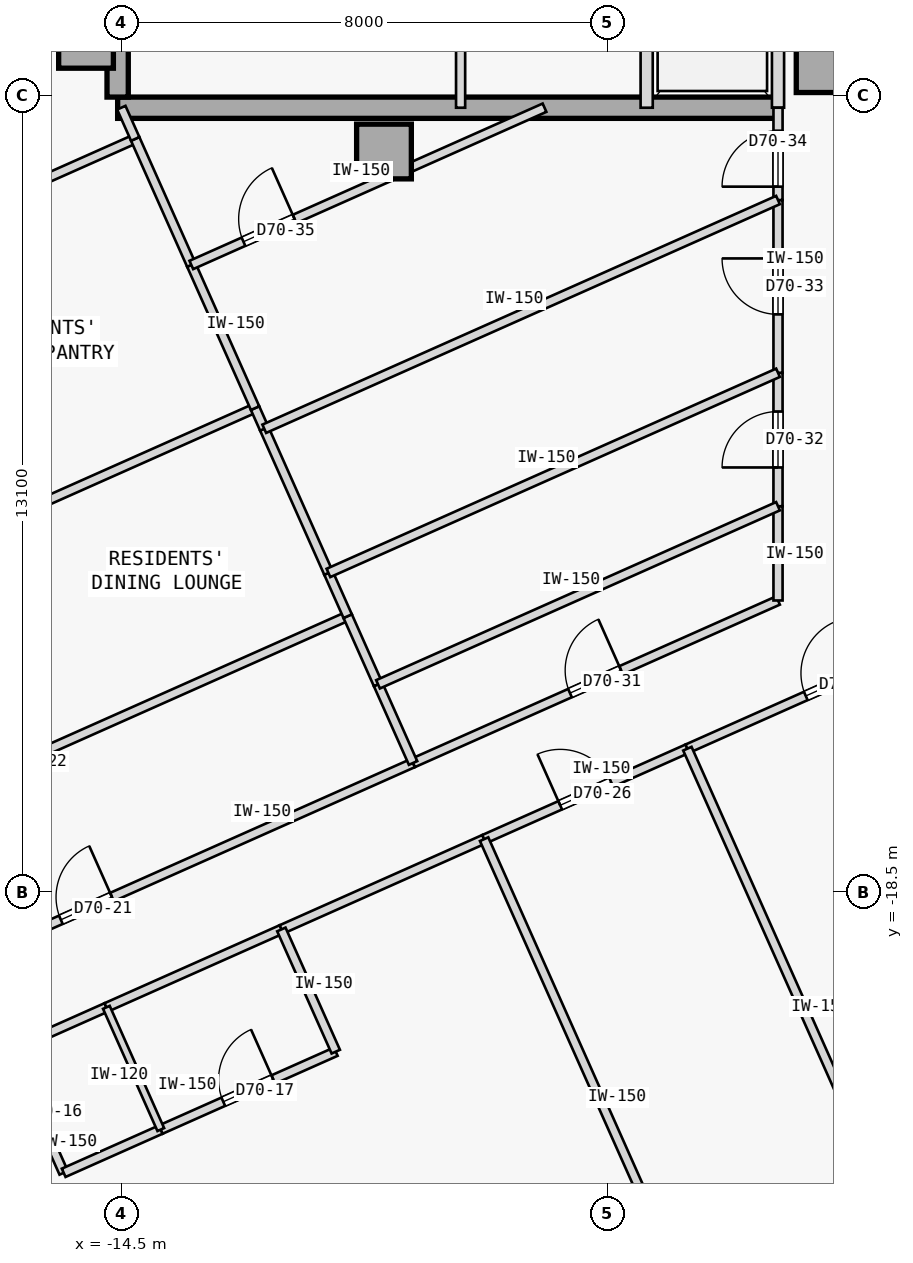
"""IFC4 building model, lengths in metres.
Left out: names, types, materials, properties, quantities, classifications, styles, units other than length and angle.
Written with IfcOpenShell. Run it as: python <this file> out.ifc"""

import sys

from ifc_helpers import new_model, si_unit, direction, frame, frame_2d, origin, origin_2d, place, context, subcontext, project, spatial, rectangle, extrude, element, fill, save


model = new_model("IFC4")
c1 = context("Model", 3, precision=1e-05, world=origin(), true_north=direction((0.0, 1.0)))
c2 = subcontext(c1, "Body", "Model", "MODEL_VIEW")
j1 = project(units=[si_unit("LENGTHUNIT", "METRE"), si_unit("PLANEANGLEUNIT", "RADIAN")], contexts=[c1])
p1 = place(None, origin())
s1 = spatial("IfcSite", under=j1, at=p1, CompositionType="ELEMENT")
p2 = place(p1, origin())
s2 = spatial("IfcBuilding", under=s1, at=p2, CompositionType="ELEMENT")
p3 = place(p2, frame((0.0, 0.0, 262.2)))
s3 = spatial("IfcBuildingStorey", under=s2, at=p3, CompositionType="ELEMENT", Elevation=262.2)
for number, where, z_axis, x_axis in (
    (1, (-15.08, -4.5, 0.0), (0.0, 0.0, 1.0), (1.0, 0.0, 0.0)),
    (2, (-10.18, -6.32, 0.0), (0.0, 0.0, 1.0), (1.0, 0.0, 0.0)),
    (3, (-2.95, -4.9, 0.0), (0.0, 0.0, 1.0), (1.0, 0.0, 0.0)),
):
    element("IfcColumn", number, at=place(p3, frame(where, z_axis=z_axis, x_axis=x_axis)), inside=s3, PredefinedType="COLUMN", context=c2, shape_type="SweptSolid", body=[
        extrude(rectangle(XDim=0.9, YDim=0.9, at=origin_2d()), origin(), (0.0, 0.0, 1.0), 3.35),
    ])
p4 = place(p3, frame((-14.56, -5.6, 0.0), z_axis=(0.0, 0.0, 1.0), x_axis=(1.0, 0.0, 0.0)))
e4 = element("IfcWall", 4, at=p4, inside=s3, PredefinedType="SHEAR", context=c2, shape_type="SweptSolid", body=[
    extrude(rectangle(XDim=10.86, YDim=0.35, at=frame_2d((5.43, 0.0))), origin(), (0.0, 0.0, 1.0), 3.125),
])
p5 = place(p3, frame((-14.56, -5.425, 0.0), z_axis=(0.0, 0.0, 1.0), x_axis=(0.0, 1.0, 0.0)))
e5 = element("IfcWall", 5, at=p5, inside=s3, PredefinedType="SHEAR", context=c2, shape_type="SweptSolid", body=[
    extrude(rectangle(XDim=10.85, YDim=0.35, at=frame_2d((5.425, 0.0))), origin(), (0.0, 0.0, 1.0), 3.125),
])
for number, where, z_axis, x_axis in (
    (6, (-3.7, -5.6, 0.0), (0.0, 0.0, 1.0), (0.0, 1.0, 0.0)),
    (7, (-5.86, -5.6, 0.0), (0.0, 0.0, 1.0), (0.0, 1.0, 0.0)),
):
    element("IfcWall", number, at=place(p3, frame(where, z_axis=z_axis, x_axis=x_axis)), inside=s3, PredefinedType="STANDARD", context=c2, shape_type="SweptSolid", body=[
        extrude(rectangle(XDim=2.65, YDim=0.2, at=frame_2d((1.325, 0.0))), origin(), (0.0, 0.0, 1.0), 3.125),
    ])
p6 = place(p3, frame((-8.92, -5.6, 0.0), z_axis=(0.0, 0.0, 1.0), x_axis=(0.0, 1.0, 0.0)))
e8 = element("IfcWall", 8, at=p6, inside=s3, PredefinedType="PARTITIONING", context=c2, shape_type="SweptSolid", body=[
    extrude(rectangle(XDim=2.65, YDim=0.15, at=frame_2d((1.325, 0.0))), origin(), (0.0, 0.0, 1.0), 3.125),
])
p7 = place(p3, frame((-11.868, -19.113, 0.0), z_axis=(0.0, 0.0, 1.0), x_axis=(0.913543802, 0.40674036169, 0.0)))
e9 = element("IfcWall", 9, at=p7, inside=s3, PredefinedType="PARTITIONING", context=c2, shape_type="SweptSolid", body=[
    extrude(rectangle(XDim=3.65, YDim=0.15, at=frame_2d((1.825, 0.0))), origin(), (0.0, 0.0, 1.0), 3.125),
])
p8 = place(p3, frame((-16.342, -21.105, 0.0), z_axis=(0.0, 0.0, 1.0), x_axis=(0.9135579554, 0.406708571492, 0.0)))
e10 = element("IfcWall", 10, at=p8, inside=s3, PredefinedType="PARTITIONING", context=c2, shape_type="SweptSolid", body=[
    extrude(rectangle(XDim=1.748, YDim=0.15, at=frame_2d((0.874, 0.0))), origin(), (0.0, 0.0, 1.0), 3.125),
])
p9 = place(p3, frame((-14.745, -20.394, 0.0), z_axis=(0.0, 0.0, 1.0), x_axis=(0.913542880558, 0.406742431252, 0.0)))
e11 = element("IfcWall", 11, at=p9, inside=s3, PredefinedType="PARTITIONING", context=c2, shape_type="SweptSolid", body=[
    extrude(rectangle(XDim=3.15, YDim=0.15, at=frame_2d((1.575, 0.0))), origin(), (0.0, 0.0, 1.0), 3.125),
])
p10 = place(p3, frame((-20.445, -21.159, 0.0), z_axis=(0.0, 0.0, 1.0), x_axis=(0.913547681516, 0.406731648137, 0.0)))
e12 = element("IfcWall", 12, at=p10, inside=s3, PredefinedType="PARTITIONING", context=c2, shape_type="SweptSolid", body=[
    extrude(rectangle(XDim=11.76, YDim=0.15, at=frame_2d((5.88, 0.0))), origin(), (0.0, 0.0, 1.0), 3.125),
])
p11 = place(p10, frame((5.42, 0.0, 0.0)))
e13 = element("IfcOpeningElement", 13, at=p11, cuts=e12, PredefinedType="OPENING", context=c2, shape_type="SweptSolid", body=[
    extrude(rectangle(XDim=0.92, YDim=2.15, at=frame_2d((0.46, 1.075))), frame((0.0, 0.085, 0.0), z_axis=(0.0, -1.0, 0.0), x_axis=(1.0, 0.0, 0.0)), (0.0, 0.0, 1.0), 0.17),
])
p12 = place(p3, frame((-8.533, -17.628, 0.0), z_axis=(0.0, 0.0, 1.0), x_axis=(0.913560976273, 0.406701785873, 0.0)))
e14 = element("IfcWall", 14, at=p12, inside=s3, PredefinedType="PARTITIONING", context=c2, shape_type="SweptSolid", body=[
    extrude(rectangle(XDim=3.659, YDim=0.15, at=frame_2d((1.829, 0.0))), origin(), (0.0, 0.0, 1.0), 3.125),
])
p13 = place(p12, frame((1.369, 0.0, 0.0)))
e15 = element("IfcOpeningElement", 15, at=p13, cuts=e14, PredefinedType="OPENING", context=c2, shape_type="SweptSolid", body=[
    extrude(rectangle(XDim=0.92, YDim=2.15, at=frame_2d((0.46, 1.075))), frame((0.0, 0.085, 0.0), z_axis=(0.0, -1.0, 0.0), x_axis=(1.0, 0.0, 0.0)), (0.0, 0.0, 1.0), 0.17),
])
p14 = place(p3, frame((-5.191, -16.14, 0.0), z_axis=(0.0, 0.0, 1.0), x_axis=(0.913541346619, 0.40674587646, 0.0)))
e16 = element("IfcWall", 16, at=p14, inside=s3, PredefinedType="PARTITIONING", context=c2, shape_type="SweptSolid", body=[
    extrude(rectangle(XDim=5.183, YDim=0.15, at=frame_2d((2.591, 0.0))), origin(), (0.0, 0.0, 1.0), 3.125),
])
p15 = place(p14, frame((2.132, 0.0, 0.0)))
e17 = element("IfcOpeningElement", 17, at=p15, cuts=e16, PredefinedType="OPENING", context=c2, shape_type="SweptSolid", body=[
    extrude(rectangle(XDim=0.92, YDim=2.15, at=frame_2d((0.46, 1.075))), frame((0.0, 0.085, 0.0), z_axis=(0.0, -1.0, 0.0), x_axis=(1.0, 0.0, 0.0)), (0.0, 0.0, 1.0), 0.17),
])
p16 = place(p3, frame((-9.702, -16.375, 0.0), z_axis=(0.0, 0.0, 1.0), x_axis=(0.913552389019, 0.406721074594, 0.0)))
e18 = element("IfcWall", 18, at=p16, inside=s3, PredefinedType="PARTITIONING", context=c2, shape_type="SweptSolid", body=[
    extrude(rectangle(XDim=6.57, YDim=0.15, at=frame_2d((3.285, 0.0))), origin(), (0.0, 0.0, 1.0), 3.125),
])
p17 = place(p16, frame((2.825, 0.0, 0.0)))
e19 = element("IfcOpeningElement", 19, at=p17, cuts=e18, PredefinedType="OPENING", context=c2, shape_type="SweptSolid", body=[
    extrude(rectangle(XDim=0.92, YDim=2.15, at=frame_2d((0.46, 1.075))), frame((0.0, 0.085, 0.0), z_axis=(0.0, -1.0, 0.0), x_axis=(1.0, 0.0, 0.0)), (0.0, 0.0, 1.0), 0.17),
])
p18 = place(p3, frame((-3.7, -13.703, 0.0), z_axis=(0.0, 0.0, 1.0), x_axis=(-0.000157529929, 0.999999987592, 0.0)))
e20 = element("IfcWall", 20, at=p18, inside=s3, PredefinedType="PARTITIONING", context=c2, shape_type="SweptSolid", body=[
    extrude(rectangle(XDim=1.55, YDim=0.15, at=frame_2d((0.775, 0.0))), origin(), (0.0, 0.0, 1.0), 3.125),
])
p19 = place(p3, frame((-3.7, -12.154, 0.0), z_axis=(0.0, 0.0, 1.0), x_axis=(0.000111222333, 0.999999993815, 0.0)))
e21 = element("IfcWall", 21, at=p19, inside=s3, PredefinedType="PARTITIONING", context=c2, shape_type="SweptSolid", body=[
    extrude(rectangle(XDim=2.195, YDim=0.15, at=frame_2d((1.098, 0.0))), origin(), (0.0, 0.0, 1.0), 3.125),
])
p20 = place(p19, frame((0.637, 0.0, 0.0)))
e22 = element("IfcOpeningElement", 22, at=p20, cuts=e21, PredefinedType="OPENING", context=c2, shape_type="SweptSolid", body=[
    extrude(rectangle(XDim=0.92, YDim=2.15, at=frame_2d((0.46, 1.075))), frame((0.0, 0.085, 0.0), z_axis=(0.0, -1.0, 0.0), x_axis=(1.0, 0.0, 0.0)), (0.0, 0.0, 1.0), 0.17),
])
p21 = place(p3, frame((-3.7, -9.958, 0.0), z_axis=(0.0, 0.0, 1.0), x_axis=(-0.000171909917, 0.999999985223, 0.0)))
e23 = element("IfcWall", 23, at=p21, inside=s3, PredefinedType="PARTITIONING", context=c2, shape_type="SweptSolid", body=[
    extrude(rectangle(XDim=2.84, YDim=0.15, at=frame_2d((1.42, 0.0))), origin(), (0.0, 0.0, 1.0), 3.125),
])
p22 = place(p21, frame((0.96, 0.0, 0.0)))
e24 = element("IfcOpeningElement", 24, at=p22, cuts=e23, PredefinedType="OPENING", context=c2, shape_type="SweptSolid", body=[
    extrude(rectangle(XDim=0.92, YDim=2.15, at=frame_2d((0.46, 1.075))), frame((0.0, 0.085, 0.0), z_axis=(0.0, -1.0, 0.0), x_axis=(1.0, 0.0, 0.0)), (0.0, 0.0, 1.0), 0.17),
])
p23 = place(p3, frame((-3.7, -7.118, 0.0), z_axis=(0.0, 0.0, 1.0), x_axis=(0.000321543392, 0.999999948305, 0.0)))
e25 = element("IfcWall", 25, at=p23, inside=s3, PredefinedType="PARTITIONING", context=c2, shape_type="SweptSolid", body=[
    extrude(rectangle(XDim=1.519, YDim=0.15, at=frame_2d((0.759, 0.0))), origin(), (0.0, 0.0, 1.0), 3.125),
])
p24 = place(p23, frame((0.22, 0.0, 0.0)))
e26 = element("IfcOpeningElement", 26, at=p24, cuts=e25, PredefinedType="OPENING", context=c2, shape_type="SweptSolid", body=[
    extrude(rectangle(XDim=0.92, YDim=2.15, at=frame_2d((0.46, 1.075))), frame((0.0, 0.085, 0.0), z_axis=(0.0, -1.0, 0.0), x_axis=(1.0, 0.0, 0.0)), (0.0, 0.0, 1.0), 0.17),
])
p25 = place(p3, frame((-15.448, -23.115, 0.0), z_axis=(0.0, 0.0, 1.0), x_axis=(-0.406725294076, 0.913550510459, 0.0)))
e27 = element("IfcWall", 27, at=p25, inside=s3, PredefinedType="PARTITIONING", context=c2, shape_type="SweptSolid", body=[
    extrude(rectangle(XDim=2.2, YDim=0.15, at=frame_2d((1.1, 0.0))), origin(), (0.0, 0.0, 1.0), 3.125),
])
p26 = place(p25, frame((0.66, 0.0, 0.0)))
e28 = element("IfcOpeningElement", 28, at=p26, cuts=e27, PredefinedType="OPENING", context=c2, shape_type="SweptSolid", body=[
    extrude(rectangle(XDim=0.88, YDim=2.15, at=frame_2d((0.44, 1.075))), frame((0.0, 0.085, 0.0), z_axis=(0.0, -1.0, 0.0), x_axis=(1.0, 0.0, 0.0)), (0.0, 0.0, 1.0), 0.17),
])
p27 = place(p3, frame((-15.448, -23.115, 0.0), z_axis=(0.0, 0.0, 1.0), x_axis=(0.9135579554, 0.406708571492, 0.0)))
e29 = element("IfcWall", 29, at=p27, inside=s3, PredefinedType="PARTITIONING", context=c2, shape_type="SweptSolid", body=[
    extrude(rectangle(XDim=1.748, YDim=0.15, at=frame_2d((0.874, 0.0))), origin(), (0.0, 0.0, 1.0), 3.125),
])
p28 = place(p3, frame((-13.851, -22.404, 0.0), z_axis=(0.0, 0.0, 1.0), x_axis=(0.913542880558, 0.406742431252, 0.0)))
e30 = element("IfcWall", 30, at=p28, inside=s3, PredefinedType="PARTITIONING", context=c2, shape_type="SweptSolid", body=[
    extrude(rectangle(XDim=3.15, YDim=0.15, at=frame_2d((1.575, 0.0))), origin(), (0.0, 0.0, 1.0), 3.125),
])
p29 = place(p28, frame((1.125, 0.0, 0.0)))
e31 = element("IfcOpeningElement", 31, at=p29, cuts=e30, PredefinedType="OPENING", context=c2, shape_type="SweptSolid", body=[
    extrude(rectangle(XDim=0.9, YDim=2.15, at=frame_2d((0.45, 1.075))), frame((0.0, 0.085, 0.0), z_axis=(0.0, -1.0, 0.0), x_axis=(1.0, 0.0, 0.0)), (0.0, 0.0, 1.0), 0.17),
])
p30 = place(p3, frame((-10.973, -21.123, 0.0), z_axis=(0.0, 0.0, 1.0), x_axis=(-0.406725294076, 0.913550510459, 0.0)))
e32 = element("IfcWall", 32, at=p30, inside=s3, PredefinedType="PARTITIONING", context=c2, shape_type="SweptSolid", body=[
    extrude(rectangle(XDim=2.2, YDim=0.15, at=frame_2d((1.1, 0.0))), origin(), (0.0, 0.0, 1.0), 3.125),
])
p31 = place(p3, frame((-4.655, -26.339, 0.0), z_axis=(0.0, 0.0, 1.0), x_axis=(-0.406729927653, 0.913548447512, 0.0)))
e33 = element("IfcWall", 33, at=p31, inside=s3, PredefinedType="PARTITIONING", context=c2, shape_type="SweptSolid", body=[
    extrude(rectangle(XDim=9.535, YDim=0.15, at=frame_2d((4.768, 0.0))), origin(), (0.0, 0.0, 1.0), 3.125),
])
p32 = place(p3, frame((-13.851, -22.404, 0.0), z_axis=(0.0, 0.0, 1.0), x_axis=(-0.406725294076, 0.913550510459, 0.0)))
e34 = element("IfcWall", 34, at=p32, inside=s3, PredefinedType="PARTITIONING", context=c2, shape_type="SweptSolid", body=[
    extrude(rectangle(XDim=2.2, YDim=0.12, at=frame_2d((1.1, 0.0))), origin(), (0.0, 0.0, 1.0), 3.125),
])
p33 = place(p3, frame((-21.52, -18.744, 0.0), z_axis=(0.0, 0.0, 1.0), x_axis=(0.913539967617, 0.406748973651, 0.0)))
e35 = element("IfcWall", 35, at=p33, inside=s3, PredefinedType="PARTITIONING", context=c2, shape_type="SweptSolid", body=[
    extrude(rectangle(XDim=11.76, YDim=0.15, at=frame_2d((5.88, 0.0))), origin(), (0.0, 0.0, 1.0), 3.125),
])
p34 = place(p33, frame((5.42, 0.0, 0.0)))
e36 = element("IfcOpeningElement", 36, at=p34, cuts=e35, PredefinedType="OPENING", context=c2, shape_type="SweptSolid", body=[
    extrude(rectangle(XDim=0.92, YDim=2.15, at=frame_2d((0.46, 1.075))), frame((0.0, 0.085, 0.0), z_axis=(0.0, -1.0, 0.0), x_axis=(1.0, 0.0, 0.0)), (0.0, 0.0, 1.0), 0.17),
])
p35 = place(p3, frame((-9.702, -16.375, 0.0), z_axis=(0.0, 0.0, 1.0), x_axis=(-0.406762319034, 0.913534025537, 0.0)))
e37 = element("IfcWall", 37, at=p35, inside=s3, PredefinedType="PARTITIONING", context=c2, shape_type="SweptSolid", body=[
    extrude(rectangle(XDim=1.416, YDim=0.15, at=frame_2d((0.708, 0.0))), origin(), (0.0, 0.0, 1.0), 3.125),
])
p36 = place(p3, frame((-10.278, -15.082, 0.0), z_axis=(0.0, 0.0, 1.0), x_axis=(-0.406655262741, 0.913581686159, 0.0)))
e38 = element("IfcWall", 38, at=p36, inside=s3, PredefinedType="PARTITIONING", context=c2, shape_type="SweptSolid", body=[
    extrude(rectangle(XDim=1.227, YDim=0.15, at=frame_2d((0.614, 0.0))), origin(), (0.0, 0.0, 1.0), 3.125),
])
p37 = place(p3, frame((-23.043, -15.323, 0.0), z_axis=(0.0, 0.0, 1.0), x_axis=(0.913547681516, 0.406731648137, 0.0)))
e39 = element("IfcWall", 39, at=p37, inside=s3, PredefinedType="PARTITIONING", context=c2, shape_type="SweptSolid", body=[
    extrude(rectangle(XDim=11.76, YDim=0.15, at=frame_2d((5.88, 0.0))), origin(), (0.0, 0.0, 1.0), 3.125),
])
p38 = place(p37, frame((5.42, 0.0, 0.0)))
e40 = element("IfcOpeningElement", 40, at=p38, cuts=e39, PredefinedType="OPENING", context=c2, shape_type="SweptSolid", body=[
    extrude(rectangle(XDim=0.92, YDim=2.15, at=frame_2d((0.46, 1.075))), frame((0.0, 0.085, 0.0), z_axis=(0.0, -1.0, 0.0), x_axis=(1.0, 0.0, 0.0)), (0.0, 0.0, 1.0), 0.17),
])
p39 = place(p3, frame((-10.777, -13.961, 0.0), z_axis=(0.0, 0.0, 1.0), x_axis=(-0.406720744325, 0.913552536057, 0.0)))
e41 = element("IfcWall", 41, at=p39, inside=s3, PredefinedType="PARTITIONING", context=c2, shape_type="SweptSolid", body=[
    extrude(rectangle(XDim=0.778, YDim=0.15, at=frame_2d((0.389, 0.0))), origin(), (0.0, 0.0, 1.0), 3.125),
])
p40 = place(p3, frame((-11.093, -13.25, 0.0), z_axis=(0.0, 0.0, 1.0), x_axis=(-0.406723252866, 0.91355141923, 0.0)))
e42 = element("IfcWall", 42, at=p40, inside=s3, PredefinedType="PARTITIONING", context=c2, shape_type="SweptSolid", body=[
    extrude(rectangle(XDim=2.595, YDim=0.15, at=frame_2d((1.297, 0.0))), origin(), (0.0, 0.0, 1.0), 3.125),
])
p41 = place(p3, frame((-12.149, -10.88, 0.0), z_axis=(0.0, 0.0, 1.0), x_axis=(-0.406868995548, 0.913486519037, 0.0)))
e43 = element("IfcWall", 43, at=p41, inside=s3, PredefinedType="PARTITIONING", context=c2, shape_type="SweptSolid", body=[
    extrude(rectangle(XDim=0.372, YDim=0.15, at=frame_2d((0.186, 0.0))), origin(), (0.0, 0.0, 1.0), 3.125),
])
p42 = place(p3, frame((-25.014, -10.896, 0.0), z_axis=(0.0, 0.0, 1.0), x_axis=(0.913544247064, 0.406739362069, 0.0)))
e44 = element("IfcWall", 44, at=p42, inside=s3, PredefinedType="PARTITIONING", context=c2, shape_type="SweptSolid", body=[
    extrude(rectangle(XDim=11.76, YDim=0.15, at=frame_2d((5.88, 0.0))), origin(), (0.0, 0.0, 1.0), 3.125),
])
p43 = place(p42, frame((5.42, 0.0, 0.0)))
e45 = element("IfcOpeningElement", 45, at=p43, cuts=e44, PredefinedType="OPENING", context=c2, shape_type="SweptSolid", body=[
    extrude(rectangle(XDim=0.92, YDim=2.15, at=frame_2d((0.46, 1.075))), frame((0.0, 0.085, 0.0), z_axis=(0.0, -1.0, 0.0), x_axis=(1.0, 0.0, 0.0)), (0.0, 0.0, 1.0), 0.17),
])
p44 = place(p3, frame((-12.3, -10.54, 0.0), z_axis=(0.0, 0.0, 1.0), x_axis=(-0.406788806475, 0.913522231216, 0.0)))
e46 = element("IfcWall", 46, at=p44, inside=s3, PredefinedType="PARTITIONING", context=c2, shape_type="SweptSolid", body=[
    extrude(rectangle(XDim=2.577, YDim=0.15, at=frame_2d((1.289, 0.0))), origin(), (0.0, 0.0, 1.0), 3.125),
])
p45 = place(p3, frame((-13.348, -8.186, 0.0), z_axis=(0.0, 0.0, 1.0), x_axis=(-0.40673740295, 0.913545119324, 0.0)))
e47 = element("IfcWall", 47, at=p45, inside=s3, PredefinedType="PARTITIONING", context=c2, shape_type="SweptSolid", body=[
    extrude(rectangle(XDim=2.269, YDim=0.15, at=frame_2d((1.134, 0.0))), origin(), (0.0, 0.0, 1.0), 3.125),
])
p46 = place(p3, frame((-14.271, -6.113, 0.0), z_axis=(0.0, 0.0, 1.0), x_axis=(-0.406622099206, 0.913596447255, 0.0)))
e48 = element("IfcWall", 48, at=p46, inside=s3, PredefinedType="PARTITIONING", context=c2, shape_type="SweptSolid", body=[
    extrude(rectangle(XDim=0.562, YDim=0.15, at=frame_2d((0.281, 0.0))), origin(), (0.0, 0.0, 1.0), 3.125),
])
p47 = place(p3, frame((-1.312, -24.851, 0.0), z_axis=(0.0, 0.0, 1.0), x_axis=(-0.406760810574, 0.913534697196, 0.0)))
e49 = element("IfcWall", 49, at=p47, inside=s3, PredefinedType="PARTITIONING", context=c2, shape_type="SweptSolid", body=[
    extrude(rectangle(XDim=9.535, YDim=0.15, at=frame_2d((4.768, 0.0))), origin(), (0.0, 0.0, 1.0), 3.125),
])
p48 = place(p3, frame((-10.278, -15.082, 0.0), z_axis=(0.0, 0.0, 1.0), x_axis=(0.913549882956, 0.406726703513, 0.0)))
e50 = element("IfcWall", 50, at=p48, inside=s3, PredefinedType="PARTITIONING", context=c2, shape_type="SweptSolid", body=[
    extrude(rectangle(XDim=7.2, YDim=0.15, at=frame_2d((3.6, 0.0))), origin(), (0.0, 0.0, 1.0), 3.125),
])
p49 = place(p3, frame((-11.093, -13.25, 0.0), z_axis=(0.0, 0.0, 1.0), x_axis=(0.913543891457, 0.406740160767, 0.0)))
e51 = element("IfcWall", 51, at=p49, inside=s3, PredefinedType="PARTITIONING", context=c2, shape_type="SweptSolid", body=[
    extrude(rectangle(XDim=8.093, YDim=0.15, at=frame_2d((4.046, 0.0))), origin(), (0.0, 0.0, 1.0), 3.125),
])
p50 = place(p3, frame((-12.149, -10.88, 0.0), z_axis=(0.0, 0.0, 1.0), x_axis=(0.913542450291, 0.406743397631, 0.0)))
e52 = element("IfcWall", 52, at=p50, inside=s3, PredefinedType="PARTITIONING", context=c2, shape_type="SweptSolid", body=[
    extrude(rectangle(XDim=9.248, YDim=0.15, at=frame_2d((4.624, 0.0))), origin(), (0.0, 0.0, 1.0), 3.125),
])
p51 = place(p3, frame((-13.348, -8.186, 0.0), z_axis=(0.0, 0.0, 1.0), x_axis=(0.913551673432, 0.406722681896, 0.0)))
e53 = element("IfcWall", 53, at=p51, inside=s3, PredefinedType="PARTITIONING", context=c2, shape_type="SweptSolid", body=[
    extrude(rectangle(XDim=6.358, YDim=0.15, at=frame_2d((3.179, 0.0))), origin(), (0.0, 0.0, 1.0), 3.125),
])
p52 = place(p51, frame((0.939, 0.0, 0.0)))
e54 = element("IfcOpeningElement", 54, at=p52, cuts=e53, PredefinedType="OPENING", context=c2, shape_type="SweptSolid", body=[
    extrude(rectangle(XDim=0.92, YDim=2.15, at=frame_2d((0.46, 1.075))), frame((0.0, 0.085, 0.0), z_axis=(0.0, -1.0, 0.0), x_axis=(1.0, 0.0, 0.0)), (0.0, 0.0, 1.0), 0.17),
])
p53 = place(p29, origin())
e55 = element("IfcDoor", 55, at=p53, inside=s3, OperationType="SINGLE_SWING_RIGHT", PredefinedType="DOOR", context=c2, shape_type="SweptSolid", body=[
    extrude(rectangle(XDim=0.9, YDim=2.15, at=frame_2d((0.45, 1.075))), frame((0.0, 0.025, 0.0), z_axis=(0.0, -1.0, 0.0), x_axis=(1.0, 0.0, 0.0)), (0.0, 0.0, 1.0), 0.05),
])
fill(e31, e55)
p54 = place(p11, origin())
e56 = element("IfcDoor", 56, at=p54, inside=s3, OperationType="SINGLE_SWING_RIGHT", PredefinedType="DOOR", context=c2, shape_type="SweptSolid", body=[
    extrude(rectangle(XDim=0.92, YDim=2.15, at=frame_2d((0.46, 1.075))), frame((0.0, 0.025, 0.0), z_axis=(0.0, -1.0, 0.0), x_axis=(1.0, 0.0, 0.0)), (0.0, 0.0, 1.0), 0.05),
])
fill(e13, e56)
p55 = place(p13, origin())
e57 = element("IfcDoor", 57, at=p55, inside=s3, OperationType="SINGLE_SWING_LEFT", PredefinedType="DOOR", context=c2, shape_type="SweptSolid", body=[
    extrude(rectangle(XDim=0.92, YDim=2.15, at=frame_2d((0.46, 1.075))), frame((0.0, 0.025, 0.0), z_axis=(0.0, -1.0, 0.0), x_axis=(1.0, 0.0, 0.0)), (0.0, 0.0, 1.0), 0.05),
])
fill(e15, e57)
p56 = place(p15, origin())
e58 = element("IfcDoor", 58, at=p56, inside=s3, OperationType="SINGLE_SWING_RIGHT", PredefinedType="DOOR", context=c2, shape_type="SweptSolid", body=[
    extrude(rectangle(XDim=0.92, YDim=2.15, at=frame_2d((0.46, 1.075))), frame((0.0, 0.025, 0.0), z_axis=(0.0, -1.0, 0.0), x_axis=(1.0, 0.0, 0.0)), (0.0, 0.0, 1.0), 0.05),
])
fill(e17, e58)
p57 = place(p17, origin())
e59 = element("IfcDoor", 59, at=p57, inside=s3, OperationType="SINGLE_SWING_RIGHT", PredefinedType="DOOR", context=c2, shape_type="SweptSolid", body=[
    extrude(rectangle(XDim=0.92, YDim=2.15, at=frame_2d((0.46, 1.075))), frame((0.0, 0.025, 0.0), z_axis=(0.0, -1.0, 0.0), x_axis=(1.0, 0.0, 0.0)), (0.0, 0.0, 1.0), 0.05),
])
fill(e19, e59)
p58 = place(p20, origin())
e60 = element("IfcDoor", 60, at=p58, inside=s3, OperationType="SINGLE_SWING_LEFT", PredefinedType="DOOR", context=c2, shape_type="SweptSolid", body=[
    extrude(rectangle(XDim=0.92, YDim=2.15, at=frame_2d((0.46, 1.075))), frame((0.0, 0.025, 0.0), z_axis=(0.0, -1.0, 0.0), x_axis=(1.0, 0.0, 0.0)), (0.0, 0.0, 1.0), 0.05),
])
fill(e22, e60)
p59 = place(p22, origin())
e61 = element("IfcDoor", 61, at=p59, inside=s3, OperationType="SINGLE_SWING_RIGHT", PredefinedType="DOOR", context=c2, shape_type="SweptSolid", body=[
    extrude(rectangle(XDim=0.92, YDim=2.15, at=frame_2d((0.46, 1.075))), frame((0.0, 0.025, 0.0), z_axis=(0.0, -1.0, 0.0), x_axis=(1.0, 0.0, 0.0)), (0.0, 0.0, 1.0), 0.05),
])
fill(e24, e61)
p60 = place(p24, origin())
e62 = element("IfcDoor", 62, at=p60, inside=s3, OperationType="SINGLE_SWING_LEFT", PredefinedType="DOOR", context=c2, shape_type="SweptSolid", body=[
    extrude(rectangle(XDim=0.92, YDim=2.15, at=frame_2d((0.46, 1.075))), frame((0.0, 0.025, 0.0), z_axis=(0.0, -1.0, 0.0), x_axis=(1.0, 0.0, 0.0)), (0.0, 0.0, 1.0), 0.05),
])
fill(e26, e62)
p61 = place(p52, origin())
e63 = element("IfcDoor", 63, at=p61, inside=s3, OperationType="SINGLE_SWING_RIGHT", PredefinedType="DOOR", context=c2, shape_type="SweptSolid", body=[
    extrude(rectangle(XDim=0.92, YDim=2.15, at=frame_2d((0.46, 1.075))), frame((0.0, 0.025, 0.0), z_axis=(0.0, -1.0, 0.0), x_axis=(1.0, 0.0, 0.0)), (0.0, 0.0, 1.0), 0.05),
])
fill(e54, e63)
save(model, sys.argv[1])
